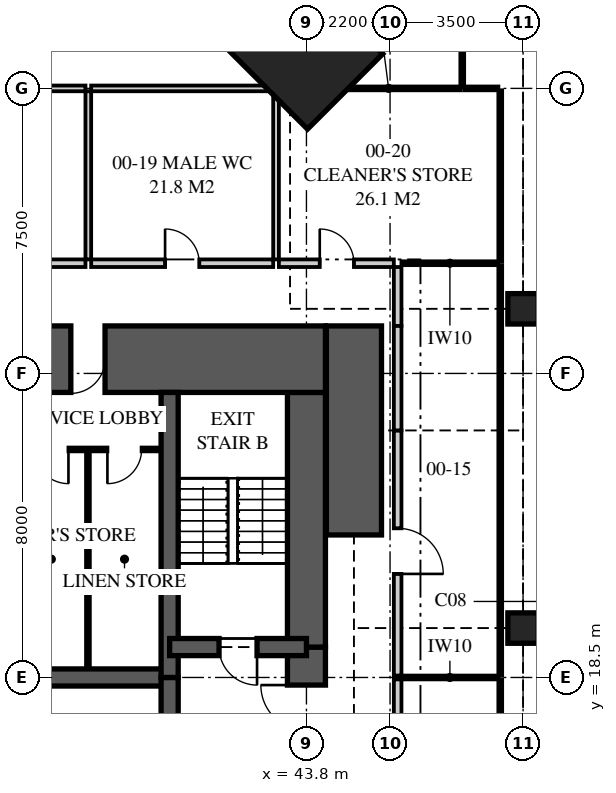
"""IFC4 building model, lengths in metres.
Left out: names, types, materials, properties, quantities, classifications, styles, units other than length and angle.
Written with IfcOpenShell. Run it as: python <this file> out.ifc"""

import sys

from ifc_helpers import new_model, si_unit, direction, frame, frame_2d, origin, origin_2d, place, context, subcontext, project, spatial, polyline, rectangle, outline, extrude, element, fill, save


model = new_model("IFC4")
c1 = context("Model", 3, precision=1e-05, world=origin(), true_north=direction((0.0, 1.0)))
c2 = subcontext(c1, "Body", "Model", "MODEL_VIEW")
j1 = project(units=[si_unit("LENGTHUNIT", "METRE"), si_unit("PLANEANGLEUNIT", "RADIAN")], contexts=[c1])
p1 = place(None, origin())
s1 = spatial("IfcSite", under=j1, at=p1, CompositionType="ELEMENT")
p2 = place(p1, origin())
s2 = spatial("IfcBuilding", under=s1, at=p2, CompositionType="ELEMENT")
p3 = place(p2, origin())
s3 = spatial("IfcBuildingStorey", under=s2, at=p3, CompositionType="ELEMENT", Elevation=0.0)
p4 = place(p3, frame((43.369, 35.369, 0.0), z_axis=(0.0, 0.0, 1.0), x_axis=(-0.707106781187, -0.707106781187, 0.0)))
e1 = element("IfcColumn", 1, at=p4, inside=s3, PredefinedType="COLUMN", context=c2, shape_type="SweptSolid", body=[
    extrude(rectangle(XDim=2.8, YDim=4.1, at=origin_2d()), origin(), (0.0, 0.0, 1.0), 6.0),
])
for number, where, z_axis, x_axis in (
    (2, (49.5, 19.8, 0.0), (0.0, 0.0, 1.0), (1.0, 0.0, 0.0)),
    (3, (49.5, 28.2, 0.0), (0.0, 0.0, 1.0), (1.0, 0.0, 0.0)),
):
    element("IfcColumn", number, at=place(p3, frame(where, z_axis=z_axis, x_axis=x_axis)), inside=s3, PredefinedType="COLUMN", context=c2, shape_type="SweptSolid", body=[
        extrude(rectangle(XDim=0.8, YDim=0.8, at=origin_2d()), origin(), (0.0, 0.0, 1.0), 6.0),
    ])
p5 = place(p3, frame((44.3, 26.875, 0.0), z_axis=(0.0, 0.0, 1.0), x_axis=(-1.0, 0.0, 0.0)))
e4 = element("IfcWall", 4, at=p5, inside=s3, PredefinedType="SHEAR", context=c2, shape_type="SweptSolid", body=[
    extrude(rectangle(XDim=8.4, YDim=1.75, at=frame_2d((4.2, 0.0))), origin(), (0.0, 0.0, 1.0), 6.0),
])
p6 = place(p5, frame((5.8, 0.0, 0.0)))
e5 = element("IfcOpeningElement", 5, at=p6, cuts=e4, PredefinedType="OPENING", context=c2, shape_type="SweptSolid", body=[
    extrude(rectangle(XDim=0.9, YDim=2.1, at=frame_2d((0.45, 1.05))), frame((0.0, 0.885, 0.0), z_axis=(0.0, -1.0, 0.0), x_axis=(1.0, 0.0, 0.0)), (0.0, 0.0, 1.0), 1.77),
])
p7 = place(p3, frame((43.8, 13.0, 0.0), z_axis=(0.0, 0.0, 1.0), x_axis=(0.0, 1.0, 0.0)))
e6 = element("IfcWall", 6, at=p7, inside=s3, PredefinedType="SHEAR", context=c2, shape_type="SweptSolid", body=[
    extrude(rectangle(XDim=6.3, YDim=1.0, at=frame_2d((3.15, 0.0))), origin(), (0.0, 0.0, 1.0), 6.0),
])
p8 = place(p7, frame((4.1, 0.0, 0.0)))
e7 = element("IfcOpeningElement", 7, at=p8, cuts=e6, PredefinedType="OPENING", context=c2, shape_type="SweptSolid", body=[
    extrude(rectangle(XDim=1.2, YDim=2.2, at=frame_2d((0.6, 1.1))), frame((0.0, 0.51, 0.0), z_axis=(0.0, -1.0, 0.0), x_axis=(1.0, 0.0, 0.0)), (0.0, 0.0, 1.0), 1.02),
])
p9 = place(p3, frame((43.8, 19.3, 0.0), z_axis=(0.0, 0.0, 1.0), x_axis=(0.0, 1.0, 0.0)))
e8 = element("IfcWall", 8, at=p9, inside=s3, PredefinedType="SHEAR", context=c2, shape_type="SweptSolid", body=[
    extrude(rectangle(XDim=6.7, YDim=1.0, at=frame_2d((3.35, 0.0))), origin(), (0.0, 0.0, 1.0), 6.0),
])
p10 = place(p3, frame((40.2, 13.7, 0.0), z_axis=(0.0, 0.0, 1.0), x_axis=(0.0, 1.0, 0.0)))
e9 = element("IfcWall", 9, at=p10, inside=s3, PredefinedType="SHEAR", context=c2, shape_type="SweptSolid", body=[
    extrude(rectangle(XDim=4.8, YDim=0.45, at=frame_2d((2.4, 0.0))), origin(), (0.0, 0.0, 1.0), 6.0),
])
p11 = place(p3, frame((40.2, 18.5, 0.0), z_axis=(0.0, 0.0, 1.0), x_axis=(0.0, 1.0, 0.0)))
e10 = element("IfcWall", 10, at=p11, inside=s3, PredefinedType="SHEAR", context=c2, shape_type="SweptSolid", body=[
    extrude(rectangle(XDim=7.5, YDim=0.45, at=frame_2d((3.75, 0.0))), origin(), (0.0, 0.0, 1.0), 6.0),
])
p12 = place(p3, frame((35.9, 18.5, 0.0), z_axis=(0.0, 0.0, 1.0), x_axis=(1.0, 0.0, 0.0)))
e11 = element("IfcWall", 11, at=p12, inside=s3, PredefinedType="SHEAR", context=c2, shape_type="SweptSolid", body=[
    extrude(rectangle(XDim=4.3, YDim=0.45, at=frame_2d((2.15, 0.0))), origin(), (0.0, 0.0, 1.0), 6.0),
])
p13 = place(p3, frame((40.2, 19.3, 0.0), z_axis=(0.0, 0.0, 1.0), x_axis=(1.0, 0.0, 0.0)))
e12 = element("IfcWall", 12, at=p13, inside=s3, PredefinedType="SHEAR", context=c2, shape_type="SweptSolid", body=[
    extrude(rectangle(XDim=3.6, YDim=0.45, at=frame_2d((1.8, 0.0))), origin(), (0.0, 0.0, 1.0), 6.0),
])
p14 = place(p13, frame((1.3, 0.0, 0.0)))
e13 = element("IfcOpeningElement", 13, at=p14, cuts=e12, PredefinedType="OPENING", context=c2, shape_type="SweptSolid", body=[
    extrude(rectangle(XDim=1.0, YDim=2.1, at=frame_2d((0.5, 1.05))), frame((0.0, 0.235, 0.0), z_axis=(0.0, -1.0, 0.0), x_axis=(1.0, 0.0, 0.0)), (0.0, 0.0, 1.0), 0.47),
])
p15 = place(p3, frame((46.2, 27.75, 0.0), z_axis=(0.0, 0.0, 1.0), x_axis=(0.0, 1.0, 0.0)))
e14 = element("IfcWall", 14, at=p15, inside=s3, PredefinedType="PARTITIONING", context=c2, shape_type="SweptSolid", body=[
    extrude(outline(polyline([(0.0, 0.0), (1.55, 0.0), (1.55, 5.72), (1.55, 5.12), (0.0, 5.12), (0.0, 5.72), (0.0, 0.0)])), frame((0.0, 0.1, 0.0), z_axis=(0.0, -1.0, 0.0), x_axis=(1.0, 0.0, 0.0)), (0.0, 0.0, 1.0), 0.2),
])
p16 = place(p3, frame((33.195, 29.4, 0.0), z_axis=(0.0, 0.0, 1.0), x_axis=(1.0, 0.0, 0.0)))
e15 = element("IfcWall", 15, at=p16, inside=s3, PredefinedType="PARTITIONING", context=c2, shape_type="SweptSolid", body=[
    extrude(outline(polyline([(0.0, 0.0), (4.79, 0.0), (4.79, 5.72), (3.115, 5.72), (3.115, 5.12), (0.495, 5.12), (0.495, 5.72), (0.0, 5.72), (0.0, 0.0)])), frame((0.0, 0.1, 0.0), z_axis=(0.0, -1.0, 0.0), x_axis=(1.0, 0.0, 0.0)), (0.0, 0.0, 1.0), 0.2),
])
p17 = place(p16, frame((1.945, 0.0, 0.0)))
e16 = element("IfcOpeningElement", 16, at=p17, cuts=e15, PredefinedType="OPENING", context=c2, shape_type="SweptSolid", body=[
    extrude(rectangle(XDim=0.9, YDim=2.1, at=frame_2d((0.45, 1.05))), frame((0.0, 0.11, 0.0), z_axis=(0.0, -1.0, 0.0), x_axis=(1.0, 0.0, 0.0)), (0.0, 0.0, 1.0), 0.22),
])
p18 = place(p3, frame((38.135, 29.4, 0.0), z_axis=(0.0, 0.0, 1.0), x_axis=(1.0, 0.0, 0.0)))
e17 = element("IfcWall", 17, at=p18, inside=s3, PredefinedType="PARTITIONING", context=c2, shape_type="SweptSolid", body=[
    extrude(outline(polyline([(0.0, 0.0), (4.79, 0.0), (4.79, 5.72), (4.79, 5.12), (3.924, 5.12), (3.924, 5.72), (0.0, 5.72), (0.0, 0.0)])), frame((0.0, 0.1, 0.0), z_axis=(0.0, -1.0, 0.0), x_axis=(1.0, 0.0, 0.0)), (0.0, 0.0, 1.0), 0.2),
])
p19 = place(p18, frame((1.945, 0.0, 0.0)))
e18 = element("IfcOpeningElement", 18, at=p19, cuts=e17, PredefinedType="OPENING", context=c2, shape_type="SweptSolid", body=[
    extrude(rectangle(XDim=0.9, YDim=2.1, at=frame_2d((0.45, 1.05))), frame((0.0, 0.11, 0.0), z_axis=(0.0, -1.0, 0.0), x_axis=(1.0, 0.0, 0.0)), (0.0, 0.0, 1.0), 0.22),
])
p20 = place(p3, frame((43.075, 29.4, 0.0), z_axis=(0.0, 0.0, 1.0), x_axis=(1.0, 0.0, 0.0)))
e19 = element("IfcWall", 19, at=p20, inside=s3, PredefinedType="PARTITIONING", context=c2, shape_type="SweptSolid", body=[
    extrude(outline(polyline([(0.0, 0.0), (3.025, 0.0), (3.025, 5.72), (3.025, 5.12), (1.604, 5.12), (0.0, 5.12), (0.0, 5.72), (0.0, 0.0)])), frame((0.0, 0.1, 0.0), z_axis=(0.0, -1.0, 0.0), x_axis=(1.0, 0.0, 0.0)), (0.0, 0.0, 1.0), 0.2),
])
p21 = place(p20, frame((1.075, 0.0, 0.0)))
e20 = element("IfcOpeningElement", 20, at=p21, cuts=e19, PredefinedType="OPENING", context=c2, shape_type="SweptSolid", body=[
    extrude(rectangle(XDim=0.9, YDim=2.1, at=frame_2d((0.45, 1.05))), frame((0.0, 0.11, 0.0), z_axis=(0.0, -1.0, 0.0), x_axis=(1.0, 0.0, 0.0)), (0.0, 0.0, 1.0), 0.22),
])
p22 = place(p3, frame((46.2, 13.0, 0.0), z_axis=(0.0, 0.0, 1.0), x_axis=(0.0, 1.0, 0.0)))
e21 = element("IfcWall", 21, at=p22, inside=s3, PredefinedType="PARTITIONING", context=c2, shape_type="SweptSolid", body=[
    extrude(rectangle(XDim=5.45, YDim=0.2, at=frame_2d((2.725, 0.0))), origin(), (0.0, 0.0, 1.0), 5.07),
])
p23 = place(p22, frame((2.575, 0.0, 0.0)))
e22 = element("IfcOpeningElement", 22, at=p23, cuts=e21, PredefinedType="OPENING", context=c2, shape_type="SweptSolid", body=[
    extrude(rectangle(XDim=1.2, YDim=2.4, at=frame_2d((0.6, 1.2))), frame((0.0, 0.11, 0.0), z_axis=(0.0, -1.0, 0.0), x_axis=(1.0, 0.0, 0.0)), (0.0, 0.0, 1.0), 0.22),
])
p24 = place(p3, frame((46.2, 18.55, 0.0), z_axis=(0.0, 0.0, 1.0), x_axis=(0.0, 1.0, 0.0)))
e23 = element("IfcWall", 23, at=p24, inside=s3, PredefinedType="PARTITIONING", context=c2, shape_type="SweptSolid", body=[
    extrude(rectangle(XDim=6.45, YDim=0.2, at=frame_2d((3.225, 0.0))), origin(), (0.0, 0.0, 1.0), 5.07),
])
p25 = place(p24, frame((2.675, 0.0, 0.0)))
e24 = element("IfcOpeningElement", 24, at=p25, cuts=e23, PredefinedType="OPENING", context=c2, shape_type="SweptSolid", body=[
    extrude(rectangle(XDim=1.2, YDim=2.4, at=frame_2d((0.6, 1.2))), frame((0.0, 0.11, 0.0), z_axis=(0.0, -1.0, 0.0), x_axis=(1.0, 0.0, 0.0)), (0.0, 0.0, 1.0), 0.22),
])
p26 = place(p3, frame((46.2, 25.0, 0.0), z_axis=(0.0, 0.0, 1.0), x_axis=(0.0, 1.0, 0.0)))
e25 = element("IfcWall", 25, at=p26, inside=s3, PredefinedType="PARTITIONING", context=c2, shape_type="SweptSolid", body=[
    extrude(outline(polyline([(0.0, 0.0), (2.75, 0.0), (2.75, 5.12), (1.89, 5.12), (1.89, 5.72), (1.31, 5.72), (1.31, 5.12), (0.11, 5.12), (0.11, 5.07), (0.0, 5.07), (0.0, 0.0)])), frame((0.0, 0.1, 0.0), z_axis=(0.0, -1.0, 0.0), x_axis=(1.0, 0.0, 0.0)), (0.0, 0.0, 1.0), 0.2),
])
p27 = place(p3, frame((46.3, 18.5, 0.0), z_axis=(0.0, 0.0, 1.0), x_axis=(1.0, 0.0, 0.0)))
e26 = element("IfcWall", 26, at=p27, inside=s3, PredefinedType="PARTITIONING", context=c2, shape_type="SweptSolid", body=[
    extrude(outline(polyline([(0.0, 0.0), (2.55, 0.0), (2.55, 5.72), (2.55, 5.12), (1.94, 5.12), (1.94, 5.72), (0.01, 5.72), (0.01, 5.07), (0.0, 5.07), (0.0, 5.72), (0.0, 0.0)])), frame((0.0, 0.05, 0.0), z_axis=(0.0, -1.0, 0.0), x_axis=(1.0, 0.0, 0.0)), (0.0, 0.0, 1.0), 0.1),
])
p28 = place(p3, frame((48.9, 7.65, 0.0), z_axis=(0.0, 0.0, 1.0), x_axis=(0.0, 1.0, 0.0)))
e27 = element("IfcWall", 27, at=p28, inside=s3, PredefinedType="PARTITIONING", context=c2, shape_type="SweptSolid", body=[
    extrude(outline(polyline([(0.0, 0.0), (10.8, 0.0), (10.8, 5.72), (10.8, 5.12), (5.01, 5.12), (3.81, 5.12), (0.0, 5.12), (0.0, 5.72), (0.0, 0.0)])), frame((0.0, 0.05, 0.0), z_axis=(0.0, -1.0, 0.0), x_axis=(1.0, 0.0, 0.0)), (0.0, 0.0, 1.0), 0.1),
])
p29 = place(p3, frame((46.3, 29.4, 0.0), z_axis=(0.0, 0.0, 1.0), x_axis=(1.0, 0.0, 0.0)))
e28 = element("IfcWall", 28, at=p29, inside=s3, PredefinedType="PARTITIONING", context=c2, shape_type="SweptSolid", body=[
    extrude(outline(polyline([(0.0, 0.0), (2.55, 0.0), (2.55, 5.72), (2.55, 5.12), (0.0, 5.12), (0.0, 5.72), (0.0, 0.0)])), frame((0.0, 0.05, 0.0), z_axis=(0.0, -1.0, 0.0), x_axis=(1.0, 0.0, 0.0)), (0.0, 0.0, 1.0), 0.1),
])
p30 = place(p3, frame((48.9, 18.55, 0.0), z_axis=(0.0, 0.0, 1.0), x_axis=(0.0, 1.0, 0.0)))
e29 = element("IfcWall", 29, at=p30, inside=s3, PredefinedType="PARTITIONING", context=c2, shape_type="SweptSolid", body=[
    extrude(outline(polyline([(0.0, 0.0), (10.8, 0.0), (10.8, 5.72), (10.8, 5.12), (9.71, 5.12), (2.51, 5.12), (1.31, 5.12), (0.0, 5.12), (0.0, 5.72), (0.0, 0.0)])), frame((0.0, 0.05, 0.0), z_axis=(0.0, -1.0, 0.0), x_axis=(1.0, 0.0, 0.0)), (0.0, 0.0, 1.0), 0.1),
])
p31 = place(p3, frame((38.06, 29.5, 0.0), z_axis=(0.0, 0.0, 1.0), x_axis=(0.0, 1.0, 0.0)))
e30 = element("IfcWall", 30, at=p31, inside=s3, PredefinedType="PLUMBINGWALL", context=c2, shape_type="SweptSolid", body=[
    extrude(rectangle(XDim=4.425, YDim=0.15, at=frame_2d((2.212, 0.0))), origin(), (0.0, 0.0, 1.0), 5.72),
])
p32 = place(p3, frame((33.195, 34.0, 0.0), z_axis=(0.0, 0.0, 1.0), x_axis=(1.0, 0.0, 0.0)))
e31 = element("IfcWall", 31, at=p32, inside=s3, PredefinedType="PLUMBINGWALL", context=c2, shape_type="SweptSolid", body=[
    extrude(outline(polyline([(0.0, 0.0), (4.79, 0.0), (4.79, 5.72), (3.09, 5.72), (3.09, 5.12), (0.52, 5.12), (0.52, 5.72), (0.0, 5.72), (0.0, 0.0)])), frame((0.0, 0.075, 0.0), z_axis=(0.0, -1.0, 0.0), x_axis=(1.0, 0.0, 0.0)), (0.0, 0.0, 1.0), 0.15),
])
p33 = place(p3, frame((43.0, 29.5, 0.0), z_axis=(0.0, 0.0, 1.0), x_axis=(0.0, 1.0, 0.0)))
e32 = element("IfcWall", 32, at=p33, inside=s3, PredefinedType="PLUMBINGWALL", context=c2, shape_type="SweptSolid", body=[
    extrude(outline(polyline([(0.0, 0.0), (4.425, 0.0), (4.425, 5.72), (4.425, 5.12), (0.0, 5.12), (0.0, 5.72), (0.0, 0.0)])), frame((0.0, 0.075, 0.0), z_axis=(0.0, -1.0, 0.0), x_axis=(1.0, 0.0, 0.0)), (0.0, 0.0, 1.0), 0.15),
])
p34 = place(p3, frame((38.135, 34.0, 0.0), z_axis=(0.0, 0.0, 1.0), x_axis=(1.0, 0.0, 0.0)))
e33 = element("IfcWall", 33, at=p34, inside=s3, PredefinedType="PLUMBINGWALL", context=c2, shape_type="SweptSolid", body=[
    extrude(outline(polyline([(0.0, 0.0), (4.79, 0.0), (4.79, 5.72), (4.79, 5.12), (3.948, 5.12), (3.948, 5.72), (0.0, 5.72), (0.0, 0.0)])), frame((0.0, 0.075, 0.0), z_axis=(0.0, -1.0, 0.0), x_axis=(1.0, 0.0, 0.0)), (0.0, 0.0, 1.0), 0.15),
])
p35 = place(p3, frame((43.075, 34.0, 0.0), z_axis=(0.0, 0.0, 1.0), x_axis=(1.0, 0.0, 0.0)))
e34 = element("IfcWall", 34, at=p35, inside=s3, PredefinedType="PARTITIONING", context=c2, shape_type="SweptSolid", body=[
    extrude(outline(polyline([(0.0, 0.0), (4.775, 0.0), (4.775, 5.72), (1.554, 5.72), (1.554, 5.12), (0.0, 5.12), (0.0, 5.72), (0.0, 0.0)])), frame((0.0, 0.05, 0.0), z_axis=(0.0, -1.0, 0.0), x_axis=(1.0, 0.0, 0.0)), (0.0, 0.0, 1.0), 0.1),
])
p36 = place(p3, frame((48.9, 29.45, 0.0), z_axis=(0.0, 0.0, 1.0), x_axis=(0.0, 1.0, 0.0)))
e35 = element("IfcWall", 35, at=p36, inside=s3, PredefinedType="PARTITIONING", context=c2, shape_type="SweptSolid", body=[
    extrude(outline(polyline([(0.0, 0.0), (4.5, 0.0), (4.5, 5.72), (4.5, 5.12), (0.01, 5.12), (0.0, 5.12), (0.0, 5.72), (0.0, 0.0)])), frame((0.0, 0.05, 0.0), z_axis=(0.0, -1.0, 0.0), x_axis=(1.0, 0.0, 0.0)), (0.0, 0.0, 1.0), 0.1),
])
p37 = place(p3, frame((47.95, 34.0, 0.0), z_axis=(0.0, 0.0, 1.0), x_axis=(1.0, 0.0, 0.0)))
e36 = element("IfcWall", 36, at=p37, inside=s3, PredefinedType="PARTITIONING", context=c2, shape_type="SweptSolid", body=[
    extrude(outline(polyline([(0.0, 0.0), (0.9, 0.0), (0.9, 5.72), (0.9, 5.12), (0.29, 5.12), (0.29, 5.72), (0.0, 5.72), (0.0, 0.0)])), frame((0.0, 0.05, 0.0), z_axis=(0.0, -1.0, 0.0), x_axis=(1.0, 0.0, 0.0)), (0.0, 0.0, 1.0), 0.1),
])
p38 = place(p3, frame((47.9, 34.05, 0.0), z_axis=(0.0, 0.0, 1.0), x_axis=(0.0, 1.0, 0.0)))
e37 = element("IfcWall", 37, at=p38, inside=s3, PredefinedType="PARTITIONING", context=c2, shape_type="SweptSolid", body=[
    extrude(outline(polyline([(0.0, 0.0), (4.5, 0.0), (4.5, 5.72), (2.579, 5.72), (2.579, 5.12), (0.059, 5.12), (0.059, 5.72), (0.0, 5.72), (0.0, 0.0)])), frame((0.0, 0.05, 0.0), z_axis=(0.0, -1.0, 0.0), x_axis=(1.0, 0.0, 0.0)), (0.0, 0.0, 1.0), 0.1),
])
p39 = place(p3, frame((36.125, 24.5, 0.0), z_axis=(0.0, 0.0, 1.0), x_axis=(1.0, 0.0, 0.0)))
e38 = element("IfcWall", 38, at=p39, inside=s3, PredefinedType="PARTITIONING", context=c2, shape_type="SweptSolid", body=[
    extrude(rectangle(XDim=3.85, YDim=0.1, at=frame_2d((1.925, 0.0))), origin(), (0.0, 0.0, 1.0), 5.72),
])
p40 = place(p39, frame((0.512, 0.0, 0.0)))
e39 = element("IfcOpeningElement", 39, at=p40, cuts=e38, PredefinedType="OPENING", context=c2, shape_type="SweptSolid", body=[
    extrude(rectangle(XDim=0.9, YDim=2.1, at=frame_2d((0.45, 1.05))), frame((0.0, 0.06, 0.0), z_axis=(0.0, -1.0, 0.0), x_axis=(1.0, 0.0, 0.0)), (0.0, 0.0, 1.0), 0.12),
])
p41 = place(p39, frame((2.438, 0.0, 0.0)))
e40 = element("IfcOpeningElement", 40, at=p41, cuts=e38, PredefinedType="OPENING", context=c2, shape_type="SweptSolid", body=[
    extrude(rectangle(XDim=0.9, YDim=2.1, at=frame_2d((0.45, 1.05))), frame((0.0, 0.06, 0.0), z_axis=(0.0, -1.0, 0.0), x_axis=(1.0, 0.0, 0.0)), (0.0, 0.0, 1.0), 0.12),
])
p42 = place(p3, frame((38.05, 18.725, 0.0), z_axis=(0.0, 0.0, 1.0), x_axis=(0.0, 1.0, 0.0)))
e41 = element("IfcWall", 41, at=p42, inside=s3, PredefinedType="PARTITIONING", context=c2, shape_type="SweptSolid", body=[
    extrude(rectangle(XDim=5.725, YDim=0.1, at=frame_2d((2.862, 0.0))), origin(), (0.0, 0.0, 1.0), 5.72),
])
p43 = place(p3, frame((45.05, 22.25, 0.0), z_axis=(0.0, 0.0, 1.0), x_axis=(0.0, 1.0, 0.0)))
e42 = element("IfcWall", 42, at=p43, inside=s3, PredefinedType="SHEAR", context=c2, shape_type="SweptSolid", body=[
    extrude(rectangle(XDim=5.5, YDim=1.45, at=frame_2d((2.75, 0.0))), origin(), (0.0, 0.0, 1.0), 6.0),
])
p44 = place(p19, origin())
e43 = element("IfcDoor", 43, at=p44, inside=s3, OperationType="SINGLE_SWING_LEFT", PredefinedType="DOOR", context=c2, shape_type="SweptSolid", body=[
    extrude(rectangle(XDim=0.9, YDim=2.1, at=frame_2d((0.45, 1.05))), frame((0.0, 0.025, 0.0), z_axis=(0.0, -1.0, 0.0), x_axis=(1.0, 0.0, 0.0)), (0.0, 0.0, 1.0), 0.05),
])
fill(e18, e43)
p45 = place(p21, origin())
e44 = element("IfcDoor", 44, at=p45, inside=s3, OperationType="SINGLE_SWING_LEFT", PredefinedType="DOOR", context=c2, shape_type="SweptSolid", body=[
    extrude(rectangle(XDim=0.9, YDim=2.1, at=frame_2d((0.45, 1.05))), frame((0.0, 0.025, 0.0), z_axis=(0.0, -1.0, 0.0), x_axis=(1.0, 0.0, 0.0)), (0.0, 0.0, 1.0), 0.05),
])
fill(e20, e44)
p46 = place(p25, frame((1.2, 0.0, 0.0), z_axis=(0.0, 0.0, 1.0), x_axis=(-1.0, 0.0, 0.0)))
e45 = element("IfcDoor", 45, at=p46, inside=s3, OperationType="SINGLE_SWING_RIGHT", PredefinedType="DOOR", context=c2, shape_type="SweptSolid", body=[
    extrude(rectangle(XDim=1.2, YDim=2.4, at=frame_2d((0.6, 1.2))), frame((0.0, 0.025, 0.0), z_axis=(0.0, -1.0, 0.0), x_axis=(1.0, 0.0, 0.0)), (0.0, 0.0, 1.0), 0.05),
])
fill(e24, e45)
p47 = place(p40, frame((0.9, 0.0, 0.0), z_axis=(0.0, 0.0, 1.0), x_axis=(-1.0, 0.0, 0.0)))
e46 = element("IfcDoor", 46, at=p47, inside=s3, OperationType="SINGLE_SWING_LEFT", PredefinedType="DOOR", context=c2, shape_type="SweptSolid", body=[
    extrude(rectangle(XDim=0.9, YDim=2.1, at=frame_2d((0.45, 1.05))), frame((0.0, 0.025, 0.0), z_axis=(0.0, -1.0, 0.0), x_axis=(1.0, 0.0, 0.0)), (0.0, 0.0, 1.0), 0.05),
])
fill(e39, e46)
p48 = place(p41, frame((0.9, 0.0, 0.0), z_axis=(0.0, 0.0, 1.0), x_axis=(-1.0, 0.0, 0.0)))
e47 = element("IfcDoor", 47, at=p48, inside=s3, OperationType="SINGLE_SWING_RIGHT", PredefinedType="DOOR", context=c2, shape_type="SweptSolid", body=[
    extrude(rectangle(XDim=0.9, YDim=2.1, at=frame_2d((0.45, 1.05))), frame((0.0, 0.025, 0.0), z_axis=(0.0, -1.0, 0.0), x_axis=(1.0, 0.0, 0.0)), (0.0, 0.0, 1.0), 0.05),
])
fill(e40, e47)
p49 = place(p14, frame((1.0, 0.0, 0.0), z_axis=(0.0, 0.0, 1.0), x_axis=(-1.0, 0.0, 0.0)))
e48 = element("IfcDoor", 48, at=p49, inside=s3, OperationType="SINGLE_SWING_LEFT", PredefinedType="DOOR", context=c2, shape_type="SweptSolid", body=[
    extrude(rectangle(XDim=1.0, YDim=2.1, at=frame_2d((0.5, 1.05))), frame((0.0, 0.025, 0.0), z_axis=(0.0, -1.0, 0.0), x_axis=(1.0, 0.0, 0.0)), (0.0, 0.0, 1.0), 0.05),
])
fill(e13, e48)
p50 = place(p8, origin())
e49 = element("IfcDoor", 49, at=p50, inside=s3, OperationType="SINGLE_SWING_RIGHT", PredefinedType="DOOR", context=c2, shape_type="SweptSolid", body=[
    extrude(rectangle(XDim=1.2, YDim=2.2, at=frame_2d((0.6, 1.1))), frame((0.0, 0.025, 0.0), z_axis=(0.0, -1.0, 0.0), x_axis=(1.0, 0.0, 0.0)), (0.0, 0.0, 1.0), 0.05),
])
fill(e7, e49)
p51 = place(p6, origin())
e50 = element("IfcDoor", 50, at=p51, inside=s3, OperationType="SINGLE_SWING_RIGHT", PredefinedType="DOOR", context=c2, shape_type="SweptSolid", body=[
    extrude(rectangle(XDim=0.9, YDim=2.1, at=frame_2d((0.45, 1.05))), frame((0.0, 0.47, 0.0), z_axis=(0.0, -1.0, 0.0), x_axis=(1.0, 0.0, 0.0)), (0.0, 0.0, 1.0), 0.8),
])
fill(e5, e50)
save(model, sys.argv[1])
